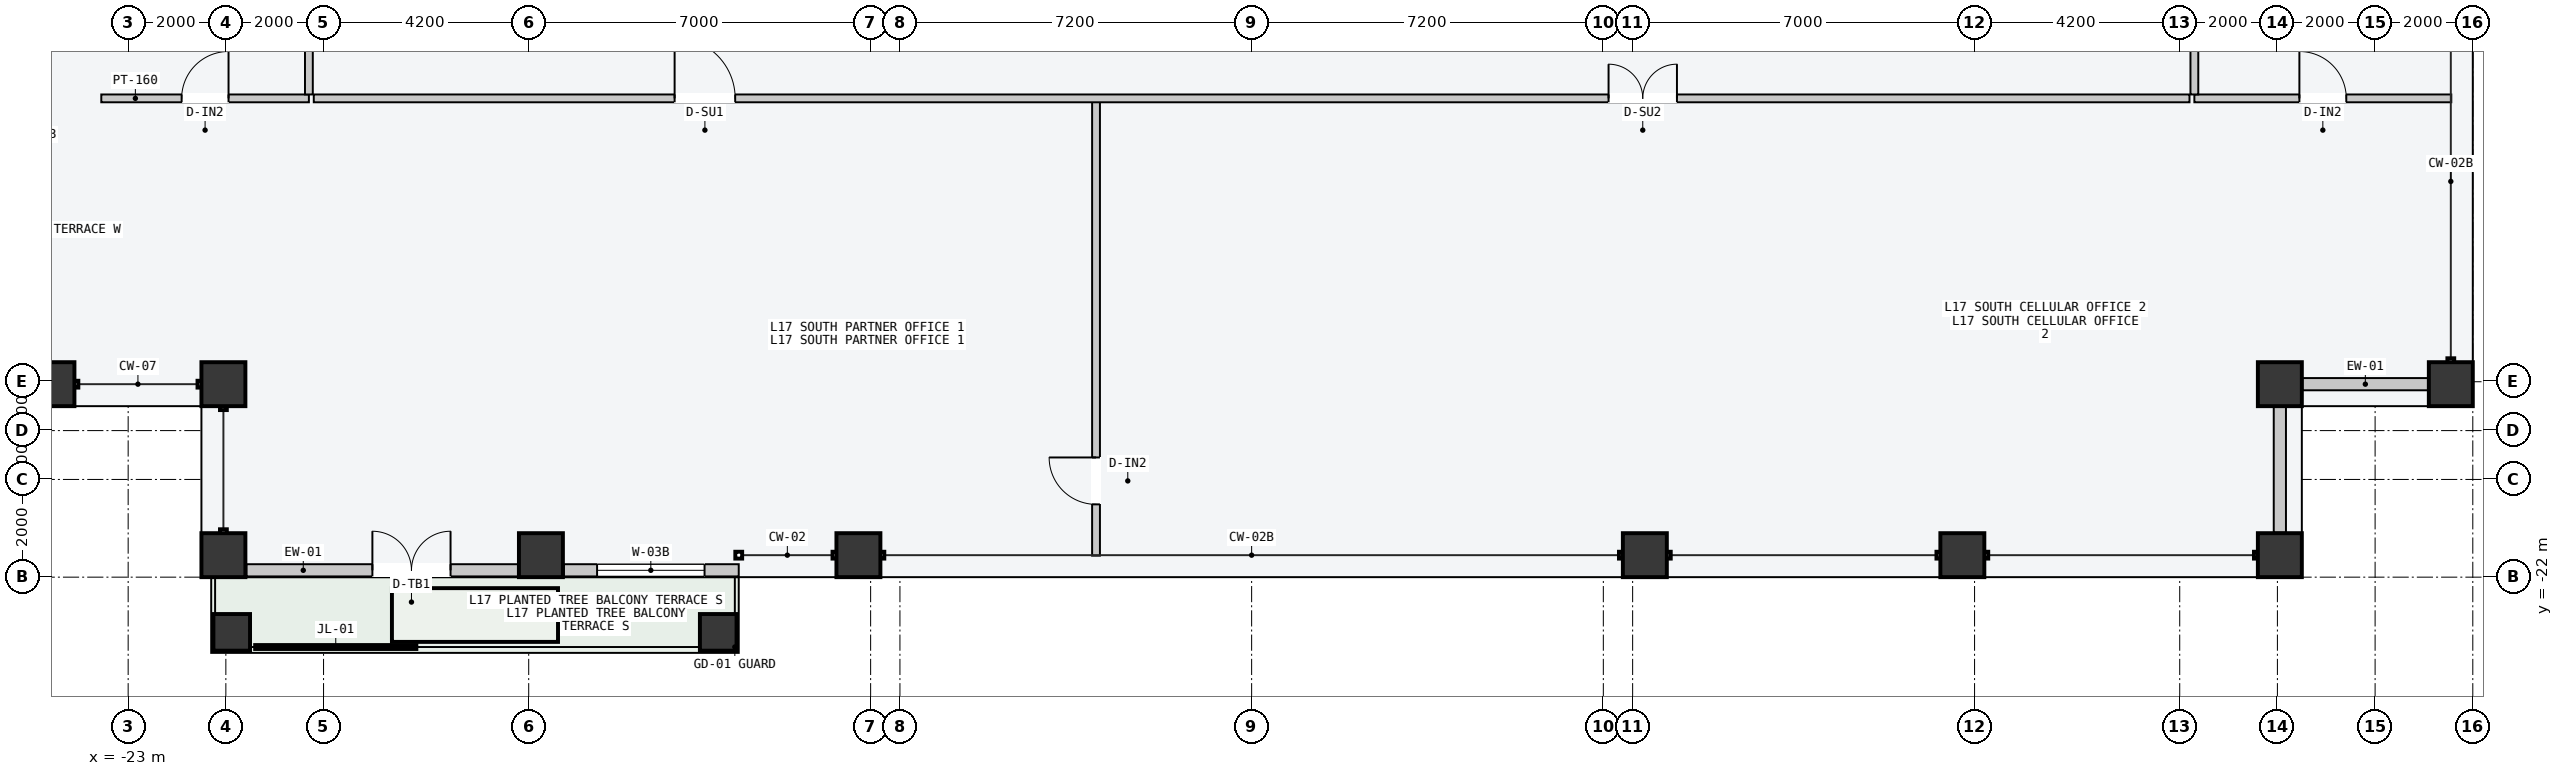
"""IFC4 building model, lengths in metres.
Left out: names, types, materials, properties, quantities, classifications, styles, units other than length and angle.
Written with IfcOpenShell. Run it as: python <this file> out.ifc"""

import sys

from ifc_helpers import new_model, si_unit, direction, frame, frame_2d, origin, origin_2d, place, context, subcontext, project, spatial, rectangle, hollow_rectangle, extrude, element, fill, save


model = new_model("IFC4")
c1 = context("Model", 3, precision=1e-05, world=origin(), true_north=direction((0.0, 1.0)))
c2 = subcontext(c1, "Body", "Model", "MODEL_VIEW")
j1 = project(units=[si_unit("LENGTHUNIT", "METRE"), si_unit("PLANEANGLEUNIT", "RADIAN")], contexts=[c1])
p1 = place(None, origin())
s1 = spatial("IfcSite", under=j1, at=p1, CompositionType="ELEMENT")
p2 = place(p1, origin())
s2 = spatial("IfcBuilding", under=s1, at=p2, CompositionType="ELEMENT")
p3 = place(p2, frame((0.0, 0.0, 67.2)))
s3 = spatial("IfcBuildingStorey", under=s2, at=p3, CompositionType="ELEMENT", Elevation=67.2)
for number, where, z_axis, x_axis in (
    (1, (-21.05, -21.55, 0.0), (0.0, 0.0, 1.0), (1.0, 0.0, 0.0)),
    (2, (-14.55, -21.55, 0.0), (0.0, 0.0, 1.0), (1.0, 0.0, 0.0)),
    (3, (-8.05, -21.55, 0.0), (0.0, 0.0, 1.0), (1.0, 0.0, 0.0)),
    (4, (8.05, -21.55, 0.0), (0.0, 0.0, 1.0), (1.0, 0.0, 0.0)),
    (5, (14.55, -21.55, 0.0), (0.0, 0.0, 1.0), (1.0, 0.0, 0.0)),
    (6, (21.05, -21.55, 0.0), (0.0, 0.0, 1.0), (1.0, 0.0, 0.0)),
    (7, (-24.55, -18.05, 0.0), (0.0, 0.0, 1.0), (0.0, 1.0, 0.0)),
    (8, (24.55, -18.05, 0.0), (0.0, 0.0, 1.0), (0.0, 1.0, 0.0)),
    (9, (21.05, -18.05, 0.0), (0.0, 0.0, 1.0), (1.0, 0.0, 0.0)),
    (10, (-21.05, -18.05, 0.0), (0.0, 0.0, 1.0), (1.0, 0.0, 0.0)),
):
    element("IfcColumn", number, at=place(p3, frame(where, z_axis=z_axis, x_axis=x_axis)), inside=s3, PredefinedType="COLUMN", context=c2, shape_type="SweptSolid", body=[
        extrude(hollow_rectangle(XDim=0.9, YDim=0.9, WallThickness=0.045, at=origin_2d()), origin(), (0.0, 0.0, 1.0), 3.6),
    ])
for number, where, z_axis, x_axis in (
    (11, (-20.88, -23.13, 0.0), (0.0, 0.0, 1.0), (1.0, 0.0, 0.0)),
    (12, (-10.92, -23.13, 0.0), (0.0, 0.0, 1.0), (1.0, 0.0, 0.0)),
):
    element("IfcColumn", number, at=place(p3, frame(where, z_axis=z_axis, x_axis=x_axis)), inside=s3, PredefinedType="COLUMN", context=c2, shape_type="SweptSolid", body=[
        extrude(hollow_rectangle(XDim=0.75, YDim=0.75, WallThickness=0.032, at=origin_2d()), origin(), (0.0, 0.0, 1.0), 3.6),
    ])
p4 = place(p3, frame((-20.58, -21.86, 0.0), z_axis=(0.0, 0.0, 1.0), x_axis=(1.0, 0.0, 0.0)))
e13 = element("IfcWall", 13, at=p4, inside=s3, PredefinedType="STANDARD", context=c2, shape_type="SweptSolid", body=[
    extrude(rectangle(XDim=5.56, YDim=0.25, at=frame_2d((2.78, 0.0))), origin(), (0.0, 0.0, 1.0), 3.4),
])
p5 = place(p4, frame((2.58, 0.0, 0.0)))
e14 = element("IfcOpeningElement", 14, at=p5, cuts=e13, PredefinedType="OPENING", context=c2, shape_type="SweptSolid", body=[
    extrude(rectangle(XDim=1.6, YDim=2.2, at=frame_2d((0.8, 1.1))), frame((0.0, 0.135, 0.0), z_axis=(0.0, -1.0, 0.0), x_axis=(1.0, 0.0, 0.0)), (0.0, 0.0, 1.0), 0.27),
])
p6 = place(p3, frame((-14.08, -21.86, 0.0), z_axis=(0.0, 0.0, 1.0), x_axis=(1.0, 0.0, 0.0)))
e15 = element("IfcWall", 15, at=p6, inside=s3, PredefinedType="STANDARD", context=c2, shape_type="SweptSolid", body=[
    extrude(rectangle(XDim=3.58, YDim=0.25, at=frame_2d((1.79, 0.0))), origin(), (0.0, 0.0, 1.0), 3.4),
])
p7 = place(p6, frame((0.68, 0.0, 0.85)))
e16 = element("IfcOpeningElement", 16, at=p7, cuts=e15, PredefinedType="OPENING", context=c2, shape_type="SweptSolid", body=[
    extrude(rectangle(XDim=2.2, YDim=2.1, at=frame_2d((1.1, 1.05))), frame((0.0, 0.135, 0.0), z_axis=(0.0, -1.0, 0.0), x_axis=(1.0, 0.0, 0.0)), (0.0, 0.0, 1.0), 0.27),
])
for number, where, z_axis, x_axis in (
    (17, (21.51, -18.05, 0.0), (0.0, 0.0, 1.0), (1.0, 0.0, 0.0)),
    (18, (21.05, -21.09, 0.0), (0.0, 0.0, 1.0), (0.0, 1.0, 0.0)),
):
    element("IfcWall", number, at=place(p3, frame(where, z_axis=z_axis, x_axis=x_axis)), inside=s3, PredefinedType="STANDARD", context=c2, shape_type="SweptSolid", body=[
        extrude(rectangle(XDim=2.58, YDim=0.25, at=frame_2d((1.29, 0.0))), origin(), (0.0, 0.0, 1.0), 2.7),
    ])
p8 = place(p3, frame((-3.186, -21.56, 0.0), z_axis=(0.0, 0.0, 1.0), x_axis=(0.0, 1.0, 0.0)))
e19 = element("IfcWall", 19, at=p8, inside=s3, PredefinedType="PARTITIONING", context=c2, shape_type="SweptSolid", body=[
    extrude(rectangle(XDim=9.3, YDim=0.16, at=frame_2d((4.65, 0.0))), origin(), (0.0, 0.0, 1.0), 3.4),
])
p9 = place(p8, frame((1.05, 0.0, 0.0)))
e20 = element("IfcOpeningElement", 20, at=p9, cuts=e19, PredefinedType="OPENING", context=c2, shape_type="SweptSolid", body=[
    extrude(rectangle(XDim=0.96, YDim=2.18, at=frame_2d((0.48, 1.09))), frame((0.0, 0.09, 0.0), z_axis=(0.0, -1.0, 0.0), x_axis=(1.0, 0.0, 0.0)), (0.0, 0.0, 1.0), 0.18),
])
p10 = place(p3, frame((-19.2, -12.2, 0.0), z_axis=(0.0, 0.0, 1.0), x_axis=(1.0, 0.0, 0.0)))
e21 = element("IfcWall", 21, at=p10, inside=s3, PredefinedType="PARTITIONING", context=c2, shape_type="SweptSolid", body=[
    extrude(rectangle(XDim=38.4, YDim=0.16, at=frame_2d((19.2, 0.0))), origin(), (0.0, 0.0, 1.0), 3.4),
])
p11 = place(p10, frame((7.387, 0.0, 0.0)))
e22 = element("IfcOpeningElement", 22, at=p11, cuts=e21, PredefinedType="OPENING", context=c2, shape_type="SweptSolid", body=[
    extrude(rectangle(XDim=1.24, YDim=2.24, at=frame_2d((0.62, 1.12))), frame((0.0, 0.09, 0.0), z_axis=(0.0, -1.0, 0.0), x_axis=(1.0, 0.0, 0.0)), (0.0, 0.0, 1.0), 0.18),
])
p12 = place(p10, frame((26.507, 0.0, 0.0)))
e23 = element("IfcOpeningElement", 23, at=p12, cuts=e21, PredefinedType="OPENING", context=c2, shape_type="SweptSolid", body=[
    extrude(rectangle(XDim=1.4, YDim=2.2, at=frame_2d((0.7, 1.1))), frame((0.0, 0.09, 0.0), z_axis=(0.0, -1.0, 0.0), x_axis=(1.0, 0.0, 0.0)), (0.0, 0.0, 1.0), 0.18),
])
p13 = place(p3, frame((-23.55, -12.2, 0.0), z_axis=(0.0, 0.0, 1.0), x_axis=(1.0, 0.0, 0.0)))
e24 = element("IfcWall", 24, at=p13, inside=s3, PredefinedType="PARTITIONING", context=c2, shape_type="SweptSolid", body=[
    extrude(rectangle(XDim=4.25, YDim=0.16, at=frame_2d((2.125, 0.0))), origin(), (0.0, 0.0, 1.0), 3.4),
])
p14 = place(p13, frame((1.645, 0.0, 0.0)))
e25 = element("IfcOpeningElement", 25, at=p14, cuts=e24, PredefinedType="OPENING", context=c2, shape_type="SweptSolid", body=[
    extrude(rectangle(XDim=0.96, YDim=2.18, at=frame_2d((0.48, 1.09))), frame((0.0, 0.09, 0.0), z_axis=(0.0, -1.0, 0.0), x_axis=(1.0, 0.0, 0.0)), (0.0, 0.0, 1.0), 0.18),
])
p15 = place(p3, frame((19.3, -12.2, 0.0), z_axis=(0.0, 0.0, 1.0), x_axis=(1.0, 0.0, 0.0)))
e26 = element("IfcWall", 26, at=p15, inside=s3, PredefinedType="PARTITIONING", context=c2, shape_type="SweptSolid", body=[
    extrude(rectangle(XDim=5.26, YDim=0.16, at=frame_2d((2.63, 0.0))), origin(), (0.0, 0.0, 1.0), 3.4),
])
p16 = place(p15, frame((2.15, 0.0, 0.0)))
e27 = element("IfcOpeningElement", 27, at=p16, cuts=e26, PredefinedType="OPENING", context=c2, shape_type="SweptSolid", body=[
    extrude(rectangle(XDim=0.96, YDim=2.18, at=frame_2d((0.48, 1.09))), frame((0.0, 0.09, 0.0), z_axis=(0.0, -1.0, 0.0), x_axis=(1.0, 0.0, 0.0)), (0.0, 0.0, 1.0), 0.18),
])
p17 = place(p3, frame((-19.3, -12.12, 0.0), z_axis=(0.0, 0.0, 1.0), x_axis=(0.0, 1.0, 0.0)))
e28 = element("IfcWall", 28, at=p17, inside=s3, PredefinedType="PARTITIONING", context=c2, shape_type="SweptSolid", body=[
    extrude(rectangle(XDim=25.44, YDim=0.16, at=frame_2d((12.72, 0.0))), origin(), (0.0, 0.0, 1.0), 3.4),
])
p18 = place(p17, frame((12.21, 0.0, 0.0)))
e29 = element("IfcOpeningElement", 29, at=p18, cuts=e28, PredefinedType="OPENING", context=c2, shape_type="SweptSolid", body=[
    extrude(rectangle(XDim=1.02, YDim=2.2, at=frame_2d((0.51, 1.1))), frame((0.0, 0.09, 0.0), z_axis=(0.0, -1.0, 0.0), x_axis=(1.0, 0.0, 0.0)), (0.0, 0.0, 1.0), 0.18),
])
p19 = place(p3, frame((19.3, -12.12, 0.0), z_axis=(0.0, 0.0, 1.0), x_axis=(0.0, 1.0, 0.0)))
e30 = element("IfcWall", 30, at=p19, inside=s3, PredefinedType="PARTITIONING", context=c2, shape_type="SweptSolid", body=[
    extrude(rectangle(XDim=25.44, YDim=0.16, at=frame_2d((12.72, 0.0))), origin(), (0.0, 0.0, 1.0), 3.4),
])
p20 = place(p19, frame((5.087, 0.0, 0.0)))
e31 = element("IfcOpeningElement", 31, at=p20, cuts=e30, PredefinedType="OPENING", context=c2, shape_type="SweptSolid", body=[
    extrude(rectangle(XDim=1.02, YDim=2.2, at=frame_2d((0.51, 1.1))), frame((0.0, 0.09, 0.0), z_axis=(0.0, -1.0, 0.0), x_axis=(1.0, 0.0, 0.0)), (0.0, 0.0, 1.0), 0.18),
])
p21 = place(p19, frame((14.607, 0.0, 0.0)))
e32 = element("IfcOpeningElement", 32, at=p21, cuts=e30, PredefinedType="OPENING", context=c2, shape_type="SweptSolid", body=[
    extrude(rectangle(XDim=1.06, YDim=2.2, at=frame_2d((0.53, 1.1))), frame((0.0, 0.09, 0.0), z_axis=(0.0, -1.0, 0.0), x_axis=(1.0, 0.0, 0.0)), (0.0, 0.0, 1.0), 0.18),
])
p22 = place(p19, frame((21.64, 0.0, 0.0)))
e33 = element("IfcOpeningElement", 33, at=p22, cuts=e30, PredefinedType="OPENING", context=c2, shape_type="SweptSolid", body=[
    extrude(rectangle(XDim=1.24, YDim=2.24, at=frame_2d((0.62, 1.12))), frame((0.0, 0.09, 0.0), z_axis=(0.0, -1.0, 0.0), x_axis=(1.0, 0.0, 0.0)), (0.0, 0.0, 1.0), 0.18),
])
p23 = place(p5, origin())
e34 = element("IfcDoor", 34, at=p23, inside=s3, OperationType="DOUBLE_DOOR_SINGLE_SWING", PredefinedType="DOOR", context=c2, shape_type="SweptSolid", body=[
    extrude(rectangle(XDim=1.6, YDim=2.2, at=frame_2d((0.8, 1.1))), frame((0.0, 0.025, 0.0), z_axis=(0.0, -1.0, 0.0), x_axis=(1.0, 0.0, 0.0)), (0.0, 0.0, 1.0), 0.05),
])
fill(e14, e34)
p24 = place(p7, origin())
e35 = element("IfcWindow", 35, at=p24, inside=s3, PartitioningType="SINGLE_PANEL", PredefinedType="WINDOW", context=c2, shape_type="SweptSolid", body=[
    extrude(rectangle(XDim=2.2, YDim=2.1, at=frame_2d((1.1, 1.05))), frame((0.0, 0.03, 0.0), z_axis=(0.0, -1.0, 0.0), x_axis=(1.0, 0.0, 0.0)), (0.0, 0.0, 1.0), 0.06),
])
fill(e16, e35)
p25 = place(p9, origin())
e36 = element("IfcDoor", 36, at=p25, inside=s3, OperationType="SINGLE_SWING_RIGHT", PredefinedType="DOOR", context=c2, shape_type="SweptSolid", body=[
    extrude(rectangle(XDim=0.96, YDim=2.18, at=frame_2d((0.48, 1.09))), frame((0.0, 0.025, 0.0), z_axis=(0.0, -1.0, 0.0), x_axis=(1.0, 0.0, 0.0)), (0.0, 0.0, 1.0), 0.05),
])
fill(e20, e36)
p26 = place(p11, origin())
e37 = element("IfcDoor", 37, at=p26, inside=s3, OperationType="SINGLE_SWING_LEFT", PredefinedType="DOOR", context=c2, shape_type="SweptSolid", body=[
    extrude(rectangle(XDim=1.24, YDim=2.24, at=frame_2d((0.62, 1.12))), frame((0.0, 0.025, 0.0), z_axis=(0.0, -1.0, 0.0), x_axis=(1.0, 0.0, 0.0)), (0.0, 0.0, 1.0), 0.05),
])
fill(e22, e37)
p27 = place(p12, origin())
e38 = element("IfcDoor", 38, at=p27, inside=s3, OperationType="DOUBLE_DOOR_SINGLE_SWING", PredefinedType="DOOR", context=c2, shape_type="SweptSolid", body=[
    extrude(rectangle(XDim=1.4, YDim=2.2, at=frame_2d((0.7, 1.1))), frame((0.0, 0.025, 0.0), z_axis=(0.0, -1.0, 0.0), x_axis=(1.0, 0.0, 0.0)), (0.0, 0.0, 1.0), 0.05),
])
fill(e23, e38)
p28 = place(p14, origin())
e39 = element("IfcDoor", 39, at=p28, inside=s3, OperationType="SINGLE_SWING_RIGHT", PredefinedType="DOOR", context=c2, shape_type="SweptSolid", body=[
    extrude(rectangle(XDim=0.96, YDim=2.18, at=frame_2d((0.48, 1.09))), frame((0.0, 0.025, 0.0), z_axis=(0.0, -1.0, 0.0), x_axis=(1.0, 0.0, 0.0)), (0.0, 0.0, 1.0), 0.05),
])
fill(e25, e39)
p29 = place(p16, origin())
e40 = element("IfcDoor", 40, at=p29, inside=s3, OperationType="SINGLE_SWING_LEFT", PredefinedType="DOOR", context=c2, shape_type="SweptSolid", body=[
    extrude(rectangle(XDim=0.96, YDim=2.18, at=frame_2d((0.48, 1.09))), frame((0.0, 0.025, 0.0), z_axis=(0.0, -1.0, 0.0), x_axis=(1.0, 0.0, 0.0)), (0.0, 0.0, 1.0), 0.05),
])
fill(e27, e40)
save(model, sys.argv[1])
